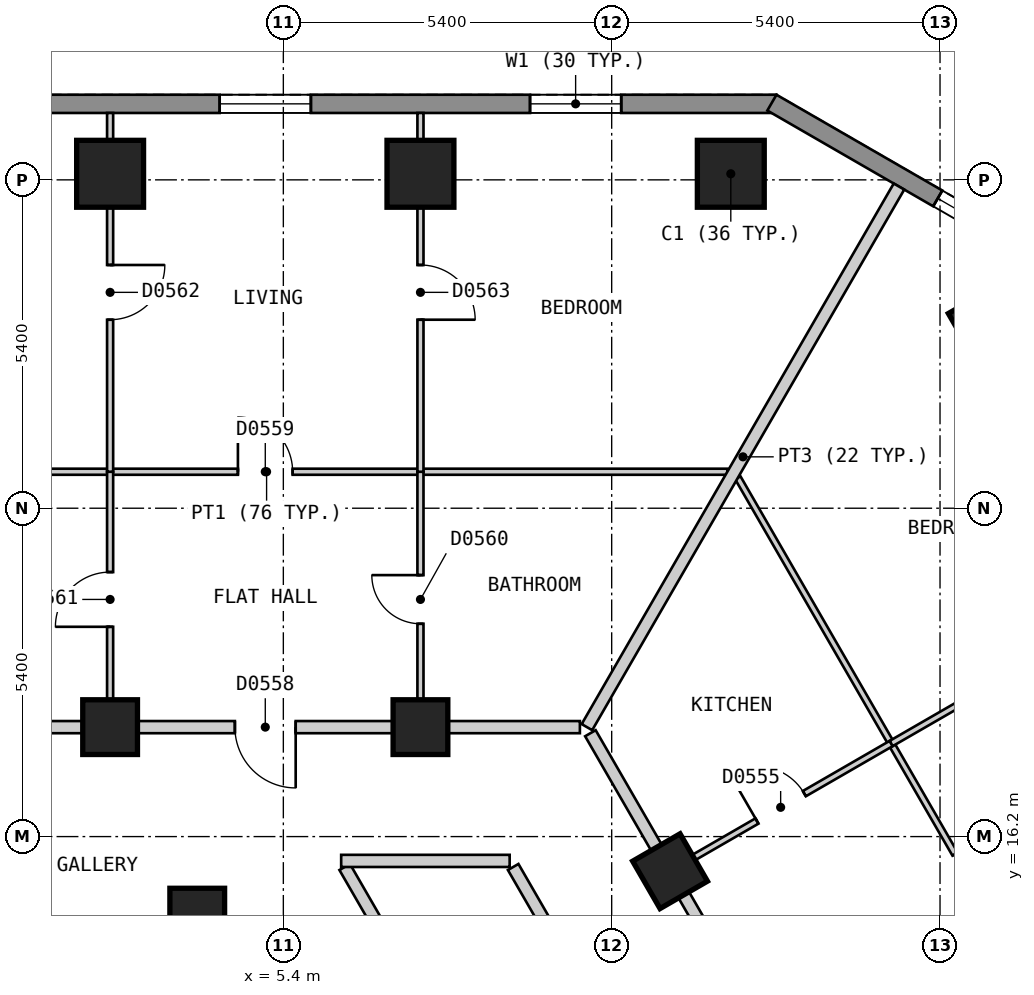
"""IFC4 building model, lengths in metres.
Left out: names, types, materials, properties, quantities, classifications, styles, units other than length and angle.
Written with IfcOpenShell. Run it as: python <this file> out.ifc"""

import sys

from ifc_helpers import new_model, si_unit, direction, frame, frame_2d, origin, origin_2d, place, context, subcontext, project, spatial, polyline, rectangle, outline, extrude, element, fill, save


model = new_model("IFC4")
c1 = context("Model", 3, precision=1e-05, world=origin(), true_north=direction((0.0, 1.0)))
c2 = subcontext(c1, "Body", "Model", "MODEL_VIEW")
j1 = project(units=[si_unit("LENGTHUNIT", "METRE"), si_unit("PLANEANGLEUNIT", "RADIAN")], contexts=[c1])
p1 = place(None, origin())
s1 = spatial("IfcSite", under=j1, at=p1, CompositionType="ELEMENT")
p2 = place(p1, origin())
s2 = spatial("IfcBuilding", under=s1, at=p2, CompositionType="ELEMENT")
p3 = place(p2, frame((0.0, 0.0, 50.4)))
s3 = spatial("IfcBuildingStorey", under=s2, at=p3, CompositionType="ELEMENT", Elevation=50.4)
for number, where, z_axis, x_axis in (
    (1, (12.759, 27.1, 0.0), (0.0, 0.0, 1.0), (-1.0, 0.0, 0.0)),
    (2, (7.655, 27.1, 0.0), (0.0, 0.0, 1.0), (-1.0, 0.0, 0.0)),
    (3, (2.551, 27.1, 0.0), (0.0, 0.0, 1.0), (-1.0, 0.0, 0.0)),
    (4, (17.089, 24.601, 0.0), (0.0, 0.0, 1.0), (-0.5, 0.866, 0.0)),
):
    element("IfcColumn", number, at=place(p3, frame(where, z_axis=z_axis, x_axis=x_axis)), inside=s3, PredefinedType="COLUMN", context=c2, shape_type="SweptSolid", body=[
        extrude(rectangle(XDim=1.1, YDim=1.1, at=origin_2d()), origin(), (0.0, 0.0, 1.0), 3.0),
    ])
for number, where, z_axis, x_axis in (
    (5, (11.76, 15.631, 0.0), (0.0, 0.0, 1.0), (-0.5, 0.866, 0.0)),
    (6, (7.655, 18.0, 0.0), (0.0, 0.0, 1.0), (-1.0, 0.0, 0.0)),
    (7, (3.984, 14.9, 0.0), (0.0, 0.0, 1.0), (1.0, 0.0, 0.0)),
    (8, (2.551, 18.0, 0.0), (0.0, 0.0, 1.0), (-1.0, 0.0, 0.0)),
):
    element("IfcColumn", number, at=place(p3, frame(where, z_axis=z_axis, x_axis=x_axis)), inside=s3, PredefinedType="COLUMN", context=c2, shape_type="SweptSolid", body=[
        extrude(rectangle(XDim=0.9, YDim=0.9, at=origin_2d()), origin(), (0.0, 0.0, 1.0), 3.0),
    ])
p4 = place(p3, frame((13.51, 28.25, 0.0), z_axis=(0.0, 0.0, 1.0), x_axis=(-1.0, 0.0, 0.0)))
e9 = element("IfcWall", 9, at=p4, inside=s3, PredefinedType="SOLIDWALL", context=c2, shape_type="SweptSolid", body=[
    extrude(outline(polyline([(0.0, -0.15), (27.02, -0.15), (26.94, 0.15), (0.08, 0.15), (0.0, -0.15)])), origin(), (0.0, 0.0, 1.0), 2.7),
])
p5 = place(p4, frame((2.553, 0.0, 0.15)))
e10 = element("IfcOpeningElement", 10, at=p5, cuts=e9, PredefinedType="OPENING", context=c2, shape_type="SweptSolid", body=[
    extrude(rectangle(XDim=1.5, YDim=2.1, at=frame_2d((0.75, 1.05))), frame((0.0, 0.16, 0.0), z_axis=(0.0, -1.0, 0.0), x_axis=(1.0, 0.0, 0.0)), (0.0, 0.0, 1.0), 0.32),
])
p6 = place(p4, frame((7.657, 0.0, 0.15)))
e11 = element("IfcOpeningElement", 11, at=p6, cuts=e9, PredefinedType="OPENING", context=c2, shape_type="SweptSolid", body=[
    extrude(rectangle(XDim=1.5, YDim=2.1, at=frame_2d((0.75, 1.05))), frame((0.0, 0.16, 0.0), z_axis=(0.0, -1.0, 0.0), x_axis=(1.0, 0.0, 0.0)), (0.0, 0.0, 1.0), 0.32),
])
p7 = place(p4, frame((12.761, 0.0, 0.15)))
e12 = element("IfcOpeningElement", 12, at=p7, cuts=e9, PredefinedType="OPENING", context=c2, shape_type="SweptSolid", body=[
    extrude(rectangle(XDim=1.5, YDim=2.1, at=frame_2d((0.75, 1.05))), frame((0.0, 0.16, 0.0), z_axis=(0.0, -1.0, 0.0), x_axis=(1.0, 0.0, 0.0)), (0.0, 0.0, 1.0), 0.32),
])
p8 = place(p4, frame((17.865, 0.0, 0.15)))
e13 = element("IfcOpeningElement", 13, at=p8, cuts=e9, PredefinedType="OPENING", context=c2, shape_type="SweptSolid", body=[
    extrude(rectangle(XDim=1.5, YDim=2.1, at=frame_2d((0.75, 1.05))), frame((0.0, 0.16, 0.0), z_axis=(0.0, -1.0, 0.0), x_axis=(1.0, 0.0, 0.0)), (0.0, 0.0, 1.0), 0.32),
])
p9 = place(p4, frame((22.969, 0.0, 0.15)))
e14 = element("IfcOpeningElement", 14, at=p9, cuts=e9, PredefinedType="OPENING", context=c2, shape_type="SweptSolid", body=[
    extrude(rectangle(XDim=1.5, YDim=2.1, at=frame_2d((0.75, 1.05))), frame((0.0, 0.16, 0.0), z_axis=(0.0, -1.0, 0.0), x_axis=(1.0, 0.0, 0.0)), (0.0, 0.0, 1.0), 0.32),
])
p10 = place(p3, frame((17.765, 25.77, 0.0), z_axis=(0.0, 0.0, 1.0), x_axis=(-0.866010750942, 0.50002537861, 0.0)))
e15 = element("IfcWall", 15, at=p10, inside=s3, PredefinedType="SOLIDWALL", context=c2, shape_type="SweptSolid", body=[
    extrude(outline(polyline([(0.0, -0.15), (5.0, -0.15), (4.919, 0.15), (0.08, 0.15), (0.0, -0.15)])), origin(), (0.0, 0.0, 1.0), 2.7),
])
p11 = place(p10, frame((0.65, 0.0, 0.15)))
e16 = element("IfcOpeningElement", 16, at=p11, cuts=e15, PredefinedType="OPENING", context=c2, shape_type="SweptSolid", body=[
    extrude(rectangle(XDim=1.2, YDim=2.1, at=frame_2d((0.6, 1.05))), frame((0.0, 0.16, 0.0), z_axis=(0.0, -1.0, 0.0), x_axis=(1.0, 0.0, 0.0)), (0.0, 0.0, 1.0), 0.32),
])
p12 = place(p3, frame((6.409, 15.7, 0.0), z_axis=(0.0, 0.0, 1.0), x_axis=(0.499930377127, -0.866065596838, 0.0)))
e17 = element("IfcWall", 17, at=p12, inside=s3, PredefinedType="PARTITIONING", context=c2, shape_type="SweptSolid", body=[
    extrude(rectangle(XDim=8.775, YDim=0.2, at=frame_2d((4.388, 0.0))), origin(), (0.0, 0.0, 1.0), 2.7),
])
p13 = place(p3, frame((9.18, 15.7, 0.0), z_axis=(0.0, 0.0, 1.0), x_axis=(0.500003652032, -0.866023295272, 0.0)))
e18 = element("IfcWall", 18, at=p13, inside=s3, PredefinedType="PARTITIONING", context=c2, shape_type="SweptSolid", body=[
    extrude(rectangle(XDim=18.012, YDim=0.2, at=frame_2d((9.006, 0.0))), origin(), (0.0, 0.0, 1.0), 2.7),
])
p14 = place(p13, frame((8.556, 0.0, 0.0)))
e19 = element("IfcOpeningElement", 19, at=p14, cuts=e18, PredefinedType="OPENING", context=c2, shape_type="SweptSolid", body=[
    extrude(rectangle(XDim=0.9, YDim=2.1, at=frame_2d((0.45, 1.05))), frame((0.0, 0.11, 0.0), z_axis=(0.0, -1.0, 0.0), x_axis=(1.0, 0.0, 0.0)), (0.0, 0.0, 1.0), 0.22),
])
p15 = place(p3, frame((10.45, 17.9, 0.0), z_axis=(0.0, 0.0, 1.0), x_axis=(0.500034352617, -0.866005569383, 0.0)))
e20 = element("IfcWall", 20, at=p15, inside=s3, PredefinedType="PARTITIONING", context=c2, shape_type="SweptSolid", body=[
    extrude(rectangle(XDim=20.553, YDim=0.2, at=frame_2d((10.276, 0.0))), origin(), (0.0, 0.0, 1.0), 2.7),
])
p16 = place(p15, frame((14.902, 0.0, 0.0)))
e21 = element("IfcOpeningElement", 21, at=p16, cuts=e20, PredefinedType="OPENING", context=c2, shape_type="SweptSolid", body=[
    extrude(rectangle(XDim=1.0, YDim=2.1, at=frame_2d((0.5, 1.05))), frame((0.0, 0.11, 0.0), z_axis=(0.0, -1.0, 0.0), x_axis=(1.0, 0.0, 0.0)), (0.0, 0.0, 1.0), 0.22),
])
p17 = place(p15, frame((4.671, 0.0, 0.0)))
e22 = element("IfcOpeningElement", 22, at=p17, cuts=e20, PredefinedType="OPENING", context=c2, shape_type="SweptSolid", body=[
    extrude(rectangle(XDim=1.0, YDim=2.1, at=frame_2d((0.5, 1.05))), frame((0.0, 0.11, 0.0), z_axis=(0.0, -1.0, 0.0), x_axis=(1.0, 0.0, 0.0)), (0.0, 0.0, 1.0), 0.22),
])
p18 = place(p3, frame((6.351, 15.8, 0.0), z_axis=(0.0, 0.0, 1.0), x_axis=(1.0, 0.0, 0.0)))
e23 = element("IfcWall", 23, at=p18, inside=s3, PredefinedType="PARTITIONING", context=c2, shape_type="SweptSolid", body=[
    extrude(rectangle(XDim=2.771, YDim=0.2, at=frame_2d((1.385, 0.0))), origin(), (0.0, 0.0, 1.0), 2.7),
])
p19 = place(p3, frame((-10.276, 18.0, 0.0), z_axis=(0.0, 0.0, 1.0), x_axis=(1.0, 0.0, 0.0)))
e24 = element("IfcWall", 24, at=p19, inside=s3, PredefinedType="PARTITIONING", context=c2, shape_type="SweptSolid", body=[
    extrude(rectangle(XDim=20.553, YDim=0.2, at=frame_2d((10.276, 0.0))), origin(), (0.0, 0.0, 1.0), 2.7),
])
p20 = place(p19, frame((14.879, 0.0, 0.0)))
e25 = element("IfcOpeningElement", 25, at=p20, cuts=e24, PredefinedType="OPENING", context=c2, shape_type="SweptSolid", body=[
    extrude(rectangle(XDim=1.0, YDim=2.1, at=frame_2d((0.5, 1.05))), frame((0.0, 0.11, 0.0), z_axis=(0.0, -1.0, 0.0), x_axis=(1.0, 0.0, 0.0)), (0.0, 0.0, 1.0), 0.22),
])
p21 = place(p19, frame((4.671, 0.0, 0.0)))
e26 = element("IfcOpeningElement", 26, at=p21, cuts=e24, PredefinedType="OPENING", context=c2, shape_type="SweptSolid", body=[
    extrude(rectangle(XDim=1.0, YDim=2.1, at=frame_2d((0.5, 1.05))), frame((0.0, 0.11, 0.0), z_axis=(0.0, -1.0, 0.0), x_axis=(1.0, 0.0, 0.0)), (0.0, 0.0, 1.0), 0.22),
])
p22 = place(p3, frame((12.875, 22.1, 0.0), z_axis=(0.0, 0.0, 1.0), x_axis=(0.499994897061, -0.866028349948, 0.0)))
e27 = element("IfcWall", 27, at=p22, inside=s3, PredefinedType="PARTITIONING", context=c2, shape_type="SweptSolid", body=[
    extrude(rectangle(XDim=15.152, YDim=0.1, at=frame_2d((7.576, 0.0))), origin(), (0.0, 0.0, 1.0), 2.7),
])
p23 = place(p22, frame((7.146, 0.0, 0.0)))
e28 = element("IfcOpeningElement", 28, at=p23, cuts=e27, PredefinedType="OPENING", context=c2, shape_type="SweptSolid", body=[
    extrude(rectangle(XDim=0.9, YDim=2.1, at=frame_2d((0.45, 1.05))), frame((0.0, 0.06, 0.0), z_axis=(0.0, -1.0, 0.0), x_axis=(1.0, 0.0, 0.0)), (0.0, 0.0, 1.0), 0.12),
])
p24 = place(p3, frame((-2.453, 22.2, 0.0), z_axis=(0.0, 0.0, 1.0), x_axis=(1.0, 0.0, 0.0)))
e29 = element("IfcWall", 29, at=p24, inside=s3, PredefinedType="PARTITIONING", context=c2, shape_type="SweptSolid", body=[
    extrude(rectangle(XDim=15.155, YDim=0.1, at=frame_2d((7.577, 0.0))), origin(), (0.0, 0.0, 1.0), 2.7),
])
p25 = place(p24, frame((7.106, 0.0, 0.0)))
e30 = element("IfcOpeningElement", 30, at=p25, cuts=e29, PredefinedType="OPENING", context=c2, shape_type="SweptSolid", body=[
    extrude(rectangle(XDim=0.9, YDim=2.1, at=frame_2d((0.45, 1.05))), frame((0.0, 0.06, 0.0), z_axis=(0.0, -1.0, 0.0), x_axis=(1.0, 0.0, 0.0)), (0.0, 0.0, 1.0), 0.12),
])
p26 = place(p3, frame((7.655, 18.1, 0.0), z_axis=(0.0, 0.0, 1.0), x_axis=(0.0, 1.0, 0.0)))
e31 = element("IfcWall", 31, at=p26, inside=s3, PredefinedType="PARTITIONING", context=c2, shape_type="SweptSolid", body=[
    extrude(rectangle(XDim=4.1, YDim=0.1, at=frame_2d((2.05, 0.0))), origin(), (0.0, 0.0, 1.0), 2.7),
])
p27 = place(p26, frame((1.6, 0.0, 0.0)))
e32 = element("IfcOpeningElement", 32, at=p27, cuts=e31, PredefinedType="OPENING", context=c2, shape_type="SweptSolid", body=[
    extrude(rectangle(XDim=0.8, YDim=2.1, at=frame_2d((0.4, 1.05))), frame((0.0, 0.06, 0.0), z_axis=(0.0, -1.0, 0.0), x_axis=(1.0, 0.0, 0.0)), (0.0, 0.0, 1.0), 0.12),
])
p28 = place(p3, frame((2.551, 18.1, 0.0), z_axis=(0.0, 0.0, 1.0), x_axis=(0.0, 1.0, 0.0)))
e33 = element("IfcWall", 33, at=p28, inside=s3, PredefinedType="PARTITIONING", context=c2, shape_type="SweptSolid", body=[
    extrude(rectangle(XDim=4.1, YDim=0.1, at=frame_2d((2.05, 0.0))), origin(), (0.0, 0.0, 1.0), 2.7),
])
p29 = place(p28, frame((1.55, 0.0, 0.0)))
e34 = element("IfcOpeningElement", 34, at=p29, cuts=e33, PredefinedType="OPENING", context=c2, shape_type="SweptSolid", body=[
    extrude(rectangle(XDim=0.9, YDim=2.1, at=frame_2d((0.45, 1.05))), frame((0.0, 0.06, 0.0), z_axis=(0.0, -1.0, 0.0), x_axis=(1.0, 0.0, 0.0)), (0.0, 0.0, 1.0), 0.12),
])
p30 = place(p3, frame((11.847, 15.681, 0.0), z_axis=(0.0, 0.0, 1.0), x_axis=(0.865980278416, 0.500078151287, 0.0)))
e35 = element("IfcWall", 35, at=p30, inside=s3, PredefinedType="PARTITIONING", context=c2, shape_type="SweptSolid", body=[
    extrude(rectangle(XDim=4.099, YDim=0.1, at=frame_2d((2.05, 0.0))), origin(), (0.0, 0.0, 1.0), 2.7),
])
p31 = place(p30, frame((1.55, 0.0, 0.0)))
e36 = element("IfcOpeningElement", 36, at=p31, cuts=e35, PredefinedType="OPENING", context=c2, shape_type="SweptSolid", body=[
    extrude(rectangle(XDim=0.9, YDim=2.1, at=frame_2d((0.45, 1.05))), frame((0.0, 0.06, 0.0), z_axis=(0.0, -1.0, 0.0), x_axis=(1.0, 0.0, 0.0)), (0.0, 0.0, 1.0), 0.12),
])
p32 = place(p3, frame((10.393, 18.0, 0.0), z_axis=(0.0, 0.0, 1.0), x_axis=(0.499945497007, 0.866056868816, 0.0)))
e37 = element("IfcWall", 37, at=p32, inside=s3, PredefinedType="PARTITIONING", context=c2, shape_type="SweptSolid", body=[
    extrude(rectangle(XDim=10.265, YDim=0.2, at=frame_2d((5.132, 0.0))), origin(), (0.0, 0.0, 1.0), 2.7),
])
p33 = place(p3, frame((15.397, 17.731, 0.0), z_axis=(0.0, 0.0, 1.0), x_axis=(0.866052608538, 0.499952877023, 0.0)))
e38 = element("IfcWall", 38, at=p33, inside=s3, PredefinedType="PARTITIONING", context=c2, shape_type="SweptSolid", body=[
    extrude(rectangle(XDim=5.9, YDim=0.1, at=frame_2d((2.95, 0.0))), origin(), (0.0, 0.0, 1.0), 2.7),
])
p34 = place(p33, frame((2.5, 0.0, 0.0)))
e39 = element("IfcOpeningElement", 39, at=p34, cuts=e38, PredefinedType="OPENING", context=c2, shape_type="SweptSolid", body=[
    extrude(rectangle(XDim=0.9, YDim=2.1, at=frame_2d((0.45, 1.05))), frame((0.0, 0.06, 0.0), z_axis=(0.0, -1.0, 0.0), x_axis=(1.0, 0.0, 0.0)), (0.0, 0.0, 1.0), 0.12),
])
p35 = place(p3, frame((7.655, 22.2, 0.0), z_axis=(0.0, 0.0, 1.0), x_axis=(0.0, 1.0, 0.0)))
e40 = element("IfcWall", 40, at=p35, inside=s3, PredefinedType="PARTITIONING", context=c2, shape_type="SweptSolid", body=[
    extrude(rectangle(XDim=5.9, YDim=0.1, at=frame_2d((2.95, 0.0))), origin(), (0.0, 0.0, 1.0), 2.7),
])
p36 = place(p35, frame((2.5, 0.0, 0.0)))
e41 = element("IfcOpeningElement", 41, at=p36, cuts=e40, PredefinedType="OPENING", context=c2, shape_type="SweptSolid", body=[
    extrude(rectangle(XDim=0.9, YDim=2.1, at=frame_2d((0.45, 1.05))), frame((0.0, 0.06, 0.0), z_axis=(0.0, -1.0, 0.0), x_axis=(1.0, 0.0, 0.0)), (0.0, 0.0, 1.0), 0.12),
])
p37 = place(p3, frame((2.551, 22.2, 0.0), z_axis=(0.0, 0.0, 1.0), x_axis=(0.0, 1.0, 0.0)))
e42 = element("IfcWall", 42, at=p37, inside=s3, PredefinedType="PARTITIONING", context=c2, shape_type="SweptSolid", body=[
    extrude(rectangle(XDim=5.9, YDim=0.1, at=frame_2d((2.95, 0.0))), origin(), (0.0, 0.0, 1.0), 2.7),
])
p38 = place(p37, frame((2.5, 0.0, 0.0)))
e43 = element("IfcOpeningElement", 43, at=p38, cuts=e42, PredefinedType="OPENING", context=c2, shape_type="SweptSolid", body=[
    extrude(rectangle(XDim=0.9, YDim=2.1, at=frame_2d((0.45, 1.05))), frame((0.0, 0.06, 0.0), z_axis=(0.0, -1.0, 0.0), x_axis=(1.0, 0.0, 0.0)), (0.0, 0.0, 1.0), 0.12),
])
p39 = place(p5, origin())
e44 = element("IfcWindow", 44, at=p39, inside=s3, PartitioningType="SINGLE_PANEL", PredefinedType="WINDOW", context=c2, shape_type="SweptSolid", body=[
    extrude(rectangle(XDim=1.5, YDim=2.1, at=frame_2d((0.75, 1.05))), frame((0.0, 0.03, 0.0), z_axis=(0.0, -1.0, 0.0), x_axis=(1.0, 0.0, 0.0)), (0.0, 0.0, 1.0), 0.06),
])
fill(e10, e44)
p40 = place(p6, origin())
e45 = element("IfcWindow", 45, at=p40, inside=s3, PartitioningType="SINGLE_PANEL", PredefinedType="WINDOW", context=c2, shape_type="SweptSolid", body=[
    extrude(rectangle(XDim=1.5, YDim=2.1, at=frame_2d((0.75, 1.05))), frame((0.0, 0.03, 0.0), z_axis=(0.0, -1.0, 0.0), x_axis=(1.0, 0.0, 0.0)), (0.0, 0.0, 1.0), 0.06),
])
fill(e11, e45)
p41 = place(p11, origin())
e46 = element("IfcWindow", 46, at=p41, inside=s3, PartitioningType="SINGLE_PANEL", PredefinedType="WINDOW", context=c2, shape_type="SweptSolid", body=[
    extrude(rectangle(XDim=1.2, YDim=2.1, at=frame_2d((0.6, 1.05))), frame((0.0, 0.03, 0.0), z_axis=(0.0, -1.0, 0.0), x_axis=(1.0, 0.0, 0.0)), (0.0, 0.0, 1.0), 0.06),
])
fill(e16, e46)
p42 = place(p23, origin())
e47 = element("IfcDoor", 47, at=p42, inside=s3, OperationType="SINGLE_SWING_LEFT", PredefinedType="DOOR", context=c2, shape_type="SweptSolid", body=[
    extrude(rectangle(XDim=0.9, YDim=2.1, at=frame_2d((0.45, 1.05))), frame((0.0, 0.025, 0.0), z_axis=(0.0, -1.0, 0.0), x_axis=(1.0, 0.0, 0.0)), (0.0, 0.0, 1.0), 0.05),
])
fill(e28, e47)
p43 = place(p31, origin())
e48 = element("IfcDoor", 48, at=p43, inside=s3, OperationType="SINGLE_SWING_LEFT", PredefinedType="DOOR", context=c2, shape_type="SweptSolid", body=[
    extrude(rectangle(XDim=0.9, YDim=2.1, at=frame_2d((0.45, 1.05))), frame((0.0, 0.025, 0.0), z_axis=(0.0, -1.0, 0.0), x_axis=(1.0, 0.0, 0.0)), (0.0, 0.0, 1.0), 0.05),
])
fill(e36, e48)
p44 = place(p20, origin())
e49 = element("IfcDoor", 49, at=p44, inside=s3, OperationType="SINGLE_SWING_RIGHT", PredefinedType="DOOR", context=c2, shape_type="SweptSolid", body=[
    extrude(rectangle(XDim=1.0, YDim=2.1, at=frame_2d((0.5, 1.05))), frame((0.0, 0.025, 0.0), z_axis=(0.0, -1.0, 0.0), x_axis=(1.0, 0.0, 0.0)), (0.0, 0.0, 1.0), 0.05),
])
fill(e25, e49)
p45 = place(p25, origin())
e50 = element("IfcDoor", 50, at=p45, inside=s3, OperationType="SINGLE_SWING_LEFT", PredefinedType="DOOR", context=c2, shape_type="SweptSolid", body=[
    extrude(rectangle(XDim=0.9, YDim=2.1, at=frame_2d((0.45, 1.05))), frame((0.0, 0.025, 0.0), z_axis=(0.0, -1.0, 0.0), x_axis=(1.0, 0.0, 0.0)), (0.0, 0.0, 1.0), 0.05),
])
fill(e30, e50)
p46 = place(p27, origin())
e51 = element("IfcDoor", 51, at=p46, inside=s3, OperationType="SINGLE_SWING_RIGHT", PredefinedType="DOOR", context=c2, shape_type="SweptSolid", body=[
    extrude(rectangle(XDim=0.8, YDim=2.1, at=frame_2d((0.4, 1.05))), frame((0.0, 0.025, 0.0), z_axis=(0.0, -1.0, 0.0), x_axis=(1.0, 0.0, 0.0)), (0.0, 0.0, 1.0), 0.05),
])
fill(e32, e51)
p47 = place(p29, origin())
e52 = element("IfcDoor", 52, at=p47, inside=s3, OperationType="SINGLE_SWING_LEFT", PredefinedType="DOOR", context=c2, shape_type="SweptSolid", body=[
    extrude(rectangle(XDim=0.9, YDim=2.1, at=frame_2d((0.45, 1.05))), frame((0.0, 0.025, 0.0), z_axis=(0.0, -1.0, 0.0), x_axis=(1.0, 0.0, 0.0)), (0.0, 0.0, 1.0), 0.05),
])
fill(e34, e52)
p48 = place(p38, origin())
e53 = element("IfcDoor", 53, at=p48, inside=s3, OperationType="SINGLE_SWING_RIGHT", PredefinedType="DOOR", context=c2, shape_type="SweptSolid", body=[
    extrude(rectangle(XDim=0.9, YDim=2.1, at=frame_2d((0.45, 1.05))), frame((0.0, 0.025, 0.0), z_axis=(0.0, -1.0, 0.0), x_axis=(1.0, 0.0, 0.0)), (0.0, 0.0, 1.0), 0.05),
])
fill(e43, e53)
p49 = place(p36, origin())
e54 = element("IfcDoor", 54, at=p49, inside=s3, OperationType="SINGLE_SWING_LEFT", PredefinedType="DOOR", context=c2, shape_type="SweptSolid", body=[
    extrude(rectangle(XDim=0.9, YDim=2.1, at=frame_2d((0.45, 1.05))), frame((0.0, 0.025, 0.0), z_axis=(0.0, -1.0, 0.0), x_axis=(1.0, 0.0, 0.0)), (0.0, 0.0, 1.0), 0.05),
])
fill(e41, e54)
save(model, sys.argv[1])
